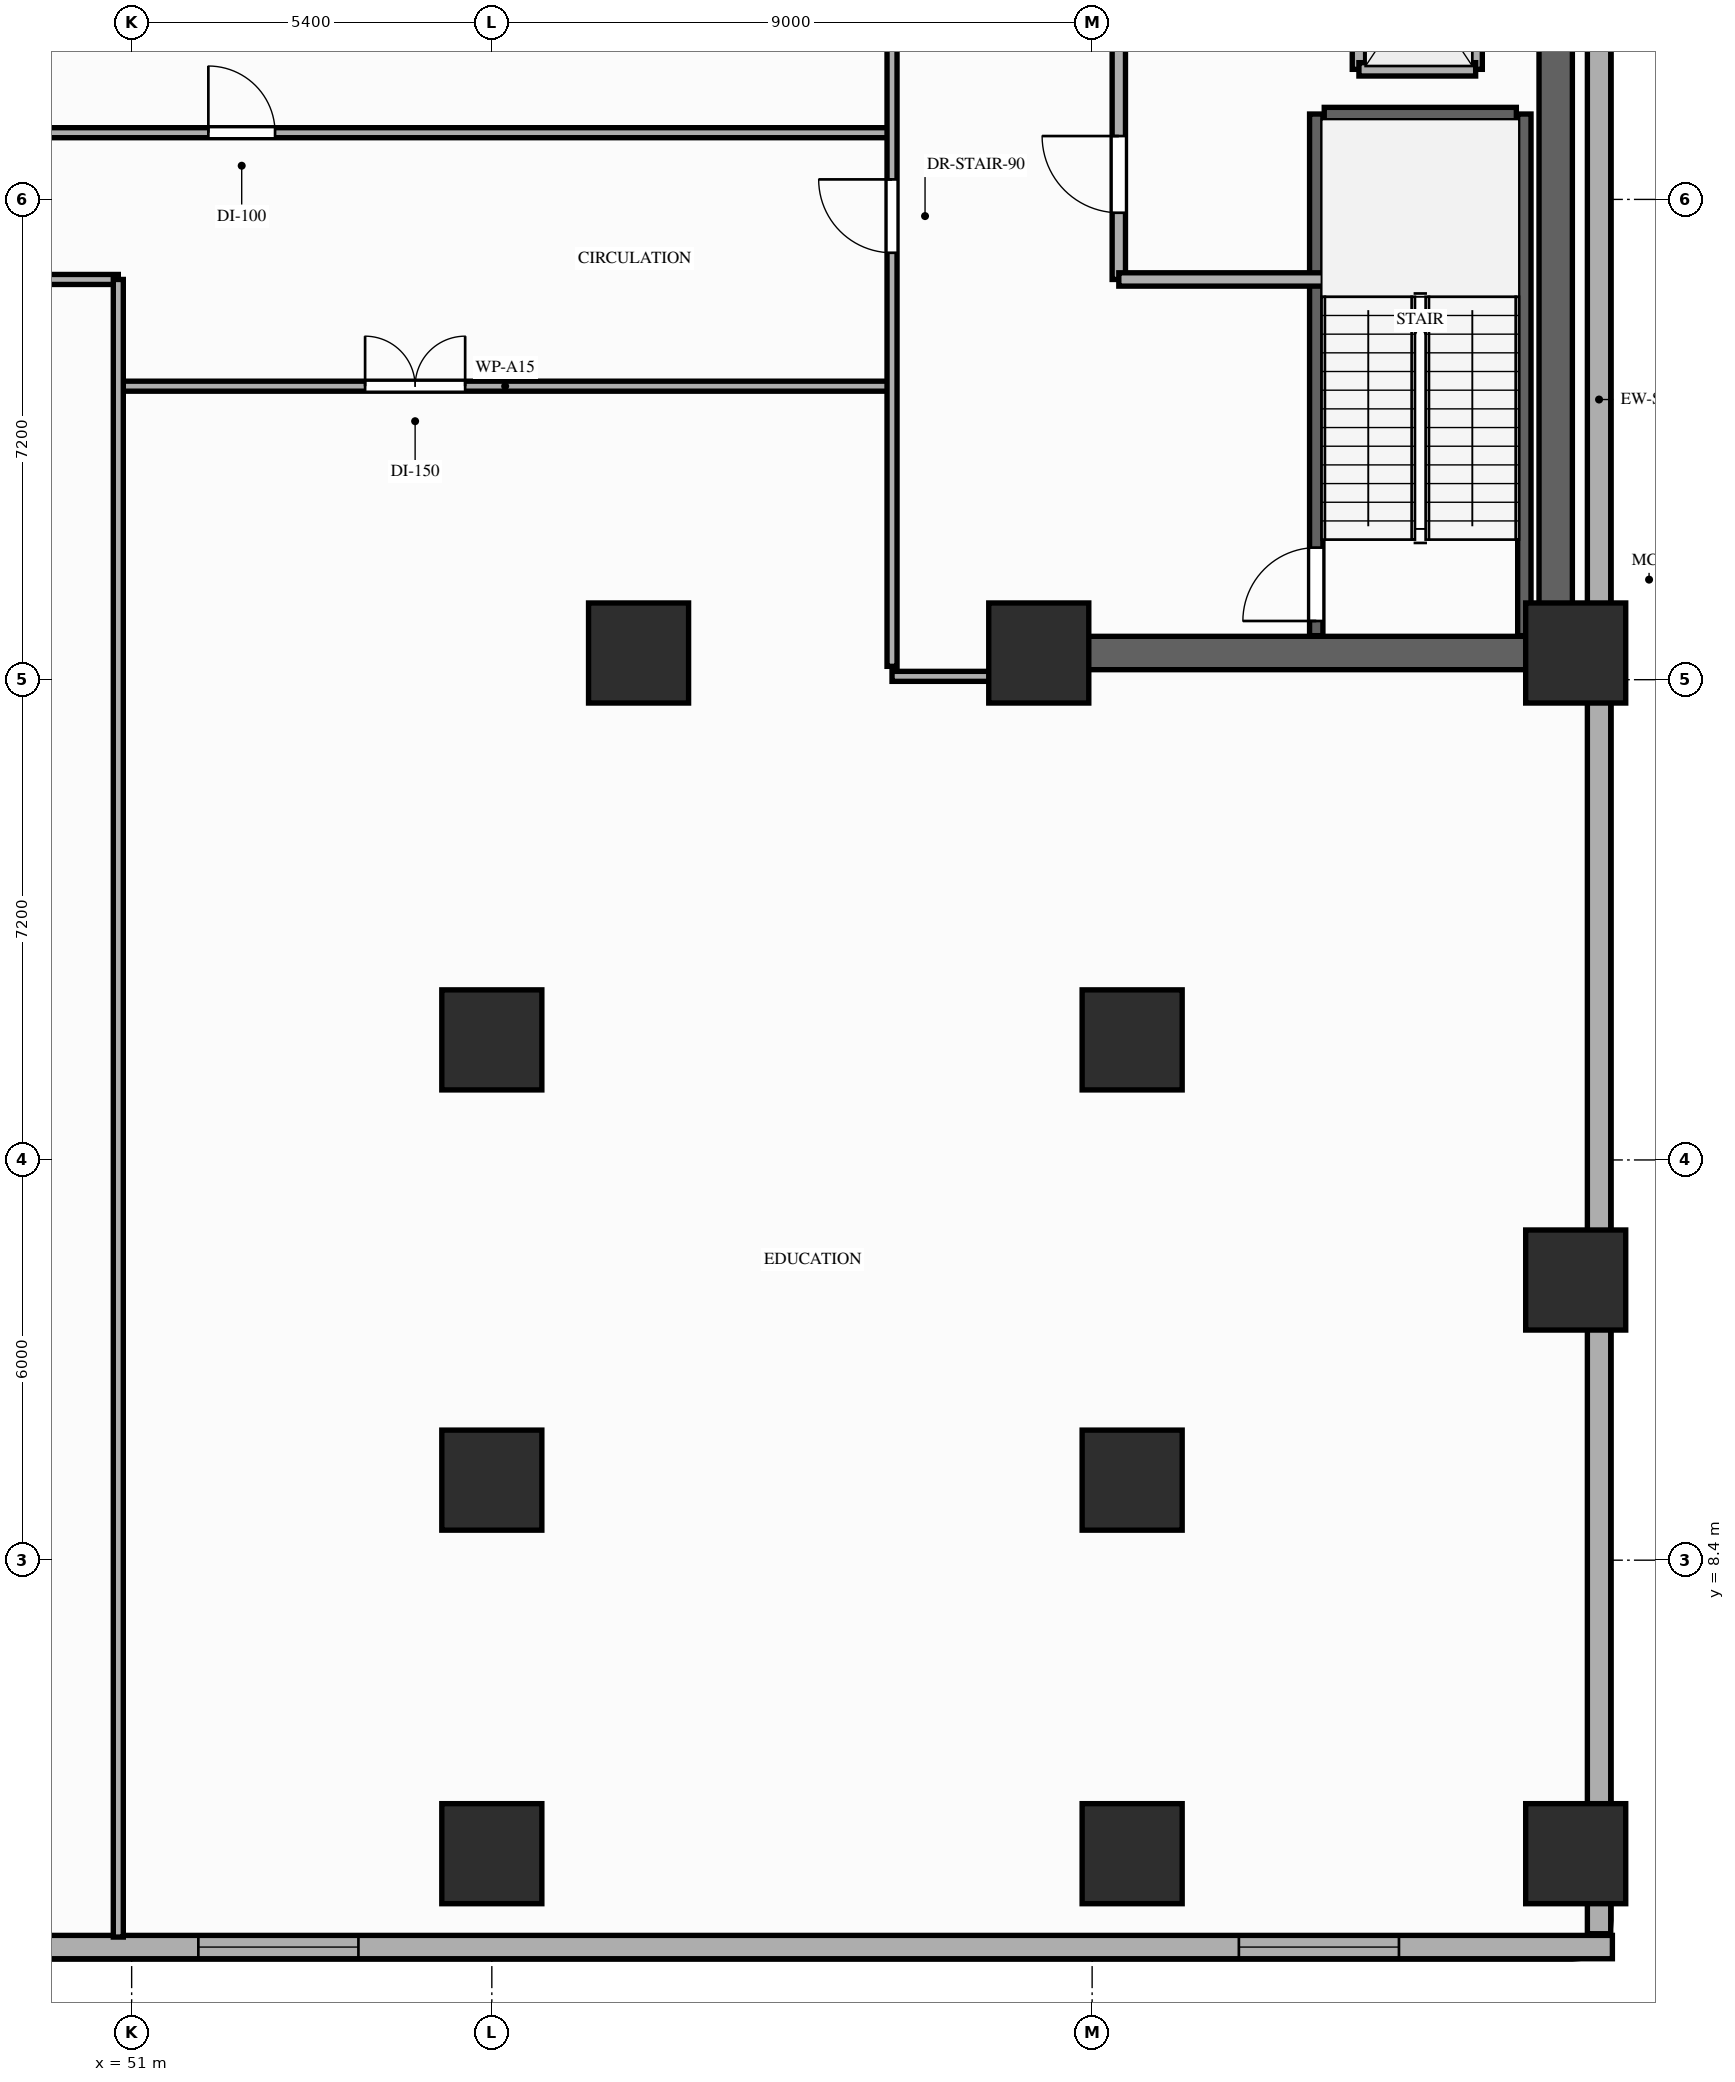
"""IFC4 building model, lengths in metres.
Left out: names, types, materials, properties, quantities, classifications, styles, units other than length and angle.
Written with IfcOpenShell. Run it as: python <this file> out.ifc"""

import sys

from ifc_helpers import new_model, si_unit, direction, frame, frame_2d, origin, origin_2d, place, context, subcontext, project, spatial, rectangle, extrude, element, fill, save


model = new_model("IFC4")
c1 = context("Model", 3, precision=1e-05, world=origin(), true_north=direction((0.0, 1.0)))
c2 = subcontext(c1, "Body", "Model", "MODEL_VIEW")
j1 = project(units=[si_unit("LENGTHUNIT", "METRE"), si_unit("PLANEANGLEUNIT", "RADIAN")], contexts=[c1])
p1 = place(None, origin())
s1 = spatial("IfcSite", under=j1, at=p1, CompositionType="ELEMENT")
p2 = place(p1, origin())
s2 = spatial("IfcBuilding", under=s1, at=p2, CompositionType="ELEMENT")
p3 = place(p2, frame((0.0, 0.0, 13.0)))
s3 = spatial("IfcBuildingStorey", under=s2, at=p3, CompositionType="ELEMENT", Elevation=13.0)
for number, where, z_axis, x_axis in (
    (1, (64.6, 22.0, 0.0), (0.0, 0.0, 1.0), (1.0, 0.0, 0.0)),
    (2, (72.65, 22.0, 0.0), (0.0, 0.0, 1.0), (1.0, 0.0, 0.0)),
    (3, (58.6, 22.0, 0.0), (0.0, 0.0, 1.0), (1.0, 0.0, 0.0)),
    (4, (56.4, 9.6, 0.0), (0.0, 0.0, 1.0), (1.0, 0.0, 0.0)),
    (5, (66.0, 9.6, 0.0), (0.0, 0.0, 1.0), (1.0, 0.0, 0.0)),
    (6, (56.4, 16.2, 0.0), (0.0, 0.0, 1.0), (1.0, 0.0, 0.0)),
    (7, (66.0, 16.2, 0.0), (0.0, 0.0, 1.0), (1.0, 0.0, 0.0)),
    (8, (56.4, 4.0, 0.0), (0.0, 0.0, 1.0), (1.0, 0.0, 0.0)),
    (9, (66.0, 4.0, 0.0), (0.0, 0.0, 1.0), (1.0, 0.0, 0.0)),
    (10, (72.65, 4.0, 0.0), (0.0, 0.0, 1.0), (1.0, 0.0, 0.0)),
    (11, (72.65, 12.6, 0.0), (0.0, 0.0, 1.0), (1.0, 0.0, 0.0)),
):
    element("IfcColumn", number, at=place(p3, frame(where, z_axis=z_axis, x_axis=x_axis)), inside=s3, PredefinedType="COLUMN", context=c2, shape_type="SweptSolid", body=[
        extrude(rectangle(XDim=1.5, YDim=1.5, at=origin_2d()), origin(), (0.0, 0.0, 1.0), 4.6),
    ])
p4 = place(p3, frame((3.6, 2.6, 0.0), z_axis=(0.0, 0.0, 1.0), x_axis=(1.0, 0.0, 0.0)))
e12 = element("IfcWall", 12, at=p4, inside=s3, PredefinedType="STANDARD", context=c2, shape_type="SweptSolid", body=[
    extrude(rectangle(XDim=69.6, YDim=0.35, at=frame_2d((34.8, 0.0))), origin(), (0.0, 0.0, 1.0), 4.35),
])
p5 = place(p4, frame((17.2, 0.0, 0.9)))
e13 = element("IfcOpeningElement", 13, at=p5, cuts=e12, PredefinedType="OPENING", context=c2, shape_type="SweptSolid", body=[
    extrude(rectangle(XDim=2.4, YDim=2.15, at=frame_2d((1.2, 1.075))), frame((0.0, 0.185, 0.0), z_axis=(0.0, -1.0, 0.0), x_axis=(1.0, 0.0, 0.0)), (0.0, 0.0, 1.0), 0.37),
])
p6 = place(p4, frame((24.6, 0.0, 0.9)))
e14 = element("IfcOpeningElement", 14, at=p6, cuts=e12, PredefinedType="OPENING", context=c2, shape_type="SweptSolid", body=[
    extrude(rectangle(XDim=2.4, YDim=2.15, at=frame_2d((1.2, 1.075))), frame((0.0, 0.185, 0.0), z_axis=(0.0, -1.0, 0.0), x_axis=(1.0, 0.0, 0.0)), (0.0, 0.0, 1.0), 0.37),
])
p7 = place(p4, frame((36.2, 0.0, 0.9)))
e15 = element("IfcOpeningElement", 15, at=p7, cuts=e12, PredefinedType="OPENING", context=c2, shape_type="SweptSolid", body=[
    extrude(rectangle(XDim=2.4, YDim=2.15, at=frame_2d((1.2, 1.075))), frame((0.0, 0.185, 0.0), z_axis=(0.0, -1.0, 0.0), x_axis=(1.0, 0.0, 0.0)), (0.0, 0.0, 1.0), 0.37),
])
p8 = place(p4, frame((48.4, 0.0, 0.9)))
e16 = element("IfcOpeningElement", 16, at=p8, cuts=e12, PredefinedType="OPENING", context=c2, shape_type="SweptSolid", body=[
    extrude(rectangle(XDim=2.4, YDim=2.15, at=frame_2d((1.2, 1.075))), frame((0.0, 0.185, 0.0), z_axis=(0.0, -1.0, 0.0), x_axis=(1.0, 0.0, 0.0)), (0.0, 0.0, 1.0), 0.37),
])
p9 = place(p4, frame((64.0, 0.0, 0.9)))
e17 = element("IfcOpeningElement", 17, at=p9, cuts=e12, PredefinedType="OPENING", context=c2, shape_type="SweptSolid", body=[
    extrude(rectangle(XDim=2.4, YDim=2.15, at=frame_2d((1.2, 1.075))), frame((0.0, 0.185, 0.0), z_axis=(0.0, -1.0, 0.0), x_axis=(1.0, 0.0, 0.0)), (0.0, 0.0, 1.0), 0.37),
])
p10 = place(p3, frame((73.0, 2.8, 0.0), z_axis=(0.0, 0.0, 1.0), x_axis=(0.0, 1.0, 0.0)))
e18 = element("IfcWall", 18, at=p10, inside=s3, PredefinedType="STANDARD", context=c2, shape_type="SweptSolid", body=[
    extrude(rectangle(XDim=46.0, YDim=0.35, at=frame_2d((23.0, 0.0))), origin(), (0.0, 0.0, 1.0), 3.63),
])
p11 = place(p3, frame((72.35, 22.0, 0.0), z_axis=(0.0, 0.0, 1.0), x_axis=(0.0, 1.0, 0.0)))
e19 = element("IfcWall", 19, at=p11, inside=s3, PredefinedType="SHEAR", context=c2, shape_type="SweptSolid", body=[
    extrude(rectangle(XDim=20.25, YDim=0.5, at=frame_2d((10.125, 0.0))), origin(), (0.0, 0.0, 1.0), 4.35),
])
p12 = place(p3, frame((64.6, 22.0, 0.0), z_axis=(0.0, 0.0, 1.0), x_axis=(1.0, 0.0, 0.0)))
e20 = element("IfcWall", 20, at=p12, inside=s3, PredefinedType="SHEAR", context=c2, shape_type="SweptSolid", body=[
    extrude(rectangle(XDim=7.5, YDim=0.5, at=frame_2d((3.75, 0.0))), origin(), (0.0, 0.0, 1.0), 4.35),
])
p13 = place(p3, frame((68.76, 22.26, 0.0), z_axis=(0.0, 0.0, 1.0), x_axis=(0.0, 1.0, 0.0)))
e21 = element("IfcWall", 21, at=p13, inside=s3, PredefinedType="SHEAR", context=c2, shape_type="SweptSolid", body=[
    extrude(rectangle(XDim=7.82, YDim=0.2, at=frame_2d((3.91, 0.0))), origin(), (0.0, 0.0, 1.0), 4.35),
])
p14 = place(p13, frame((0.22, 0.0, 0.0)))
e22 = element("IfcOpeningElement", 22, at=p14, cuts=e21, PredefinedType="OPENING", context=c2, shape_type="SweptSolid", body=[
    extrude(rectangle(XDim=1.1, YDim=2.15, at=frame_2d((0.55, 1.075))), frame((0.0, 0.11, 0.0), z_axis=(0.0, -1.0, 0.0), x_axis=(1.0, 0.0, 0.0)), (0.0, 0.0, 1.0), 0.22),
])
p15 = place(p3, frame((71.88, 22.26, 0.0), z_axis=(0.0, 0.0, 1.0), x_axis=(0.0, 1.0, 0.0)))
e23 = element("IfcWall", 23, at=p15, inside=s3, PredefinedType="SHEAR", context=c2, shape_type="SweptSolid", body=[
    extrude(rectangle(XDim=7.82, YDim=0.2, at=frame_2d((3.91, 0.0))), origin(), (0.0, 0.0, 1.0), 4.35),
])
p16 = place(p3, frame((68.88, 30.08, 0.0), z_axis=(0.0, 0.0, 1.0), x_axis=(1.0, 0.0, 0.0)))
e24 = element("IfcWall", 24, at=p16, inside=s3, PredefinedType="SHEAR", context=c2, shape_type="SweptSolid", body=[
    extrude(rectangle(XDim=2.88, YDim=0.2, at=frame_2d((1.44, 0.0))), origin(), (0.0, 0.0, 1.0), 4.35),
])
p17 = place(p3, frame((69.4, 30.75, 0.0), z_axis=(0.0, 0.0, 1.0), x_axis=(0.0, 1.0, 0.0)))
e25 = element("IfcWall", 25, at=p17, inside=s3, PredefinedType="MOVABLE", context=c2, shape_type="SweptSolid", body=[
    extrude(rectangle(XDim=2.45, YDim=0.2, at=frame_2d((1.225, 0.0))), origin(), (0.0, 0.0, 1.0), 4.35),
])
p18 = place(p17, frame((0.65, 0.0, 0.0)))
e26 = element("IfcOpeningElement", 26, at=p18, cuts=e25, PredefinedType="OPENING", context=c2, shape_type="SweptSolid", body=[
    extrude(rectangle(XDim=1.05, YDim=2.15, at=frame_2d((0.525, 1.075))), frame((0.0, 0.11, 0.0), z_axis=(0.0, -1.0, 0.0), x_axis=(1.0, 0.0, 0.0)), (0.0, 0.0, 1.0), 0.22),
])
p19 = place(p3, frame((71.15, 30.75, 0.0), z_axis=(0.0, 0.0, 1.0), x_axis=(0.0, 1.0, 0.0)))
e27 = element("IfcWall", 27, at=p19, inside=s3, PredefinedType="MOVABLE", context=c2, shape_type="SweptSolid", body=[
    extrude(rectangle(XDim=2.45, YDim=0.2, at=frame_2d((1.225, 0.0))), origin(), (0.0, 0.0, 1.0), 4.35),
])
p20 = place(p3, frame((69.4, 30.75, 0.0), z_axis=(0.0, 0.0, 1.0), x_axis=(1.0, 0.0, 0.0)))
e28 = element("IfcWall", 28, at=p20, inside=s3, PredefinedType="MOVABLE", context=c2, shape_type="SweptSolid", body=[
    extrude(rectangle(XDim=1.75, YDim=0.2, at=frame_2d((0.875, 0.0))), origin(), (0.0, 0.0, 1.0), 4.35),
])
p21 = place(p3, frame((65.8, 27.6, 0.0), z_axis=(0.0, 0.0, 1.0), x_axis=(0.0, 1.0, 0.0)))
e29 = element("IfcWall", 29, at=p21, inside=s3, PredefinedType="PARTITIONING", context=c2, shape_type="SweptSolid", body=[
    extrude(rectangle(XDim=5.5, YDim=0.2, at=frame_2d((2.75, 0.0))), origin(), (0.0, 0.0, 1.0), 4.35),
])
p22 = place(p21, frame((1.0, 0.0, 0.0)))
e30 = element("IfcOpeningElement", 30, at=p22, cuts=e29, PredefinedType="OPENING", context=c2, shape_type="SweptSolid", body=[
    extrude(rectangle(XDim=1.15, YDim=2.15, at=frame_2d((0.575, 1.075))), frame((0.0, 0.11, 0.0), z_axis=(0.0, -1.0, 0.0), x_axis=(1.0, 0.0, 0.0)), (0.0, 0.0, 1.0), 0.22),
])
p23 = place(p3, frame((65.8, 27.6, 0.0), z_axis=(0.0, 0.0, 1.0), x_axis=(1.0, 0.0, 0.0)))
e31 = element("IfcWall", 31, at=p23, inside=s3, PredefinedType="PARTITIONING", context=c2, shape_type="SweptSolid", body=[
    extrude(rectangle(XDim=3.4, YDim=0.2, at=frame_2d((1.7, 0.0))), origin(), (0.0, 0.0, 1.0), 4.35),
])
p24 = place(p3, frame((24.4, 27.6, 0.0), z_axis=(0.0, 0.0, 1.0), x_axis=(1.0, 0.0, 0.0)))
e32 = element("IfcWall", 32, at=p24, inside=s3, PredefinedType="PARTITIONING", context=c2, shape_type="SweptSolid", body=[
    extrude(rectangle(XDim=26.4, YDim=0.15, at=frame_2d((13.2, 0.0))), origin(), (0.0, 0.0, 1.0), 3.63),
])
p25 = place(p24, frame((7.6, 0.0, 0.0)))
e33 = element("IfcOpeningElement", 33, at=p25, cuts=e32, PredefinedType="OPENING", context=c2, shape_type="SweptSolid", body=[
    extrude(rectangle(XDim=1.5, YDim=2.18, at=frame_2d((0.75, 1.09))), frame((0.0, 0.085, 0.0), z_axis=(0.0, -1.0, 0.0), x_axis=(1.0, 0.0, 0.0)), (0.0, 0.0, 1.0), 0.17),
])
p26 = place(p3, frame((50.8, 26.0, 0.0), z_axis=(0.0, 0.0, 1.0), x_axis=(1.0, 0.0, 0.0)))
e34 = element("IfcWall", 34, at=p26, inside=s3, PredefinedType="PARTITIONING", context=c2, shape_type="SweptSolid", body=[
    extrude(rectangle(XDim=11.6, YDim=0.15, at=frame_2d((5.8, 0.0))), origin(), (0.0, 0.0, 1.0), 3.63),
])
p27 = place(p26, frame((3.7, 0.0, 0.0)))
e35 = element("IfcOpeningElement", 35, at=p27, cuts=e34, PredefinedType="OPENING", context=c2, shape_type="SweptSolid", body=[
    extrude(rectangle(XDim=1.5, YDim=2.18, at=frame_2d((0.75, 1.09))), frame((0.0, 0.085, 0.0), z_axis=(0.0, -1.0, 0.0), x_axis=(1.0, 0.0, 0.0)), (0.0, 0.0, 1.0), 0.17),
])
p28 = place(p3, frame((27.15, 29.8, 0.0), z_axis=(0.0, 0.0, 1.0), x_axis=(1.0, 0.0, 0.0)))
e36 = element("IfcWall", 36, at=p28, inside=s3, PredefinedType="PARTITIONING", context=c2, shape_type="SweptSolid", body=[
    extrude(rectangle(XDim=35.25, YDim=0.15, at=frame_2d((17.625, 0.0))), origin(), (0.0, 0.0, 1.0), 3.63),
])
p29 = place(p28, frame((25.0, 0.0, 0.0)))
e37 = element("IfcOpeningElement", 37, at=p29, cuts=e36, PredefinedType="OPENING", context=c2, shape_type="SweptSolid", body=[
    extrude(rectangle(XDim=1.0, YDim=2.15, at=frame_2d((0.5, 1.075))), frame((0.0, 0.085, 0.0), z_axis=(0.0, -1.0, 0.0), x_axis=(1.0, 0.0, 0.0)), (0.0, 0.0, 1.0), 0.17),
])
p30 = place(p28, frame((1.4, 0.0, 0.0)))
e38 = element("IfcOpeningElement", 38, at=p30, cuts=e36, PredefinedType="OPENING", context=c2, shape_type="SweptSolid", body=[
    extrude(rectangle(XDim=0.85, YDim=2.1, at=frame_2d((0.425, 1.05))), frame((0.0, 0.085, 0.0), z_axis=(0.0, -1.0, 0.0), x_axis=(1.0, 0.0, 0.0)), (0.0, 0.0, 1.0), 0.17),
])
p31 = place(p28, frame((5.4, 0.0, 0.0)))
e39 = element("IfcOpeningElement", 39, at=p31, cuts=e36, PredefinedType="OPENING", context=c2, shape_type="SweptSolid", body=[
    extrude(rectangle(XDim=0.95, YDim=2.1, at=frame_2d((0.475, 1.05))), frame((0.0, 0.085, 0.0), z_axis=(0.0, -1.0, 0.0), x_axis=(1.0, 0.0, 0.0)), (0.0, 0.0, 1.0), 0.17),
])
p32 = place(p28, frame((12.6, 0.0, 0.0)))
e40 = element("IfcOpeningElement", 40, at=p32, cuts=e36, PredefinedType="OPENING", context=c2, shape_type="SweptSolid", body=[
    extrude(rectangle(XDim=1.0, YDim=2.15, at=frame_2d((0.5, 1.075))), frame((0.0, 0.085, 0.0), z_axis=(0.0, -1.0, 0.0), x_axis=(1.0, 0.0, 0.0)), (0.0, 0.0, 1.0), 0.17),
])
p33 = place(p3, frame((50.8, 2.75, 0.0), z_axis=(0.0, 0.0, 1.0), x_axis=(0.0, 1.0, 0.0)))
e41 = element("IfcWall", 41, at=p33, inside=s3, PredefinedType="PARTITIONING", context=c2, shape_type="SweptSolid", body=[
    extrude(rectangle(XDim=24.85, YDim=0.15, at=frame_2d((12.425, 0.0))), origin(), (0.0, 0.0, 1.0), 3.63),
])
p34 = place(p3, frame((62.4, 21.8, 0.0), z_axis=(0.0, 0.0, 1.0), x_axis=(0.0, 1.0, 0.0)))
e42 = element("IfcWall", 42, at=p34, inside=s3, PredefinedType="PARTITIONING", context=c2, shape_type="SweptSolid", body=[
    extrude(rectangle(XDim=27.05, YDim=0.15, at=frame_2d((13.525, 0.0))), origin(), (0.0, 0.0, 1.0), 3.63),
])
p35 = place(p34, frame((6.2, 0.0, 0.0)))
e43 = element("IfcOpeningElement", 43, at=p35, cuts=e42, PredefinedType="OPENING", context=c2, shape_type="SweptSolid", body=[
    extrude(rectangle(XDim=1.1, YDim=2.15, at=frame_2d((0.55, 1.075))), frame((0.0, 0.085, 0.0), z_axis=(0.0, -1.0, 0.0), x_axis=(1.0, 0.0, 0.0)), (0.0, 0.0, 1.0), 0.17),
])
p36 = place(p3, frame((62.4, 21.65, 0.0), z_axis=(0.0, 0.0, 1.0), x_axis=(1.0, 0.0, 0.0)))
e44 = element("IfcWall", 44, at=p36, inside=s3, PredefinedType="PARTITIONING", context=c2, shape_type="SweptSolid", body=[
    extrude(rectangle(XDim=2.05, YDim=0.15, at=frame_2d((1.025, 0.0))), origin(), (0.0, 0.0, 1.0), 3.63),
])
p37 = place(p8, origin())
e45 = element("IfcWindow", 45, at=p37, inside=s3, PartitioningType="SINGLE_PANEL", PredefinedType="WINDOW", context=c2, shape_type="SweptSolid", body=[
    extrude(rectangle(XDim=2.4, YDim=2.15, at=frame_2d((1.2, 1.075))), frame((0.0, 0.03, 0.0), z_axis=(0.0, -1.0, 0.0), x_axis=(1.0, 0.0, 0.0)), (0.0, 0.0, 1.0), 0.06),
])
fill(e16, e45)
p38 = place(p9, origin())
e46 = element("IfcWindow", 46, at=p38, inside=s3, PartitioningType="SINGLE_PANEL", PredefinedType="WINDOW", context=c2, shape_type="SweptSolid", body=[
    extrude(rectangle(XDim=2.4, YDim=2.15, at=frame_2d((1.2, 1.075))), frame((0.0, 0.03, 0.0), z_axis=(0.0, -1.0, 0.0), x_axis=(1.0, 0.0, 0.0)), (0.0, 0.0, 1.0), 0.06),
])
fill(e17, e46)
p39 = place(p14, origin())
e47 = element("IfcDoor", 47, at=p39, inside=s3, OperationType="SINGLE_SWING_LEFT", PredefinedType="DOOR", context=c2, shape_type="SweptSolid", body=[
    extrude(rectangle(XDim=1.1, YDim=2.15, at=frame_2d((0.55, 1.075))), frame((0.0, 0.025, 0.0), z_axis=(0.0, -1.0, 0.0), x_axis=(1.0, 0.0, 0.0)), (0.0, 0.0, 1.0), 0.05),
])
fill(e22, e47)
p40 = place(p22, origin())
e48 = element("IfcDoor", 48, at=p40, inside=s3, OperationType="SINGLE_SWING_RIGHT", PredefinedType="DOOR", context=c2, shape_type="SweptSolid", body=[
    extrude(rectangle(XDim=1.15, YDim=2.15, at=frame_2d((0.575, 1.075))), frame((0.0, 0.025, 0.0), z_axis=(0.0, -1.0, 0.0), x_axis=(1.0, 0.0, 0.0)), (0.0, 0.0, 1.0), 0.05),
])
fill(e30, e48)
p41 = place(p29, origin())
e49 = element("IfcDoor", 49, at=p41, inside=s3, OperationType="SINGLE_SWING_LEFT", PredefinedType="DOOR", context=c2, shape_type="SweptSolid", body=[
    extrude(rectangle(XDim=1.0, YDim=2.15, at=frame_2d((0.5, 1.075))), frame((0.0, 0.025, 0.0), z_axis=(0.0, -1.0, 0.0), x_axis=(1.0, 0.0, 0.0)), (0.0, 0.0, 1.0), 0.05),
])
fill(e37, e49)
p42 = place(p27, origin())
e50 = element("IfcDoor", 50, at=p42, inside=s3, OperationType="DOUBLE_DOOR_SINGLE_SWING", PredefinedType="DOOR", context=c2, shape_type="SweptSolid", body=[
    extrude(rectangle(XDim=1.5, YDim=2.18, at=frame_2d((0.75, 1.09))), frame((0.0, 0.025, 0.0), z_axis=(0.0, -1.0, 0.0), x_axis=(1.0, 0.0, 0.0)), (0.0, 0.0, 1.0), 0.05),
])
fill(e35, e50)
p43 = place(p35, origin())
e51 = element("IfcDoor", 51, at=p43, inside=s3, OperationType="SINGLE_SWING_RIGHT", PredefinedType="DOOR", context=c2, shape_type="SweptSolid", body=[
    extrude(rectangle(XDim=1.1, YDim=2.15, at=frame_2d((0.55, 1.075))), frame((0.0, 0.025, 0.0), z_axis=(0.0, -1.0, 0.0), x_axis=(1.0, 0.0, 0.0)), (0.0, 0.0, 1.0), 0.05),
])
fill(e43, e51)
save(model, sys.argv[1])
